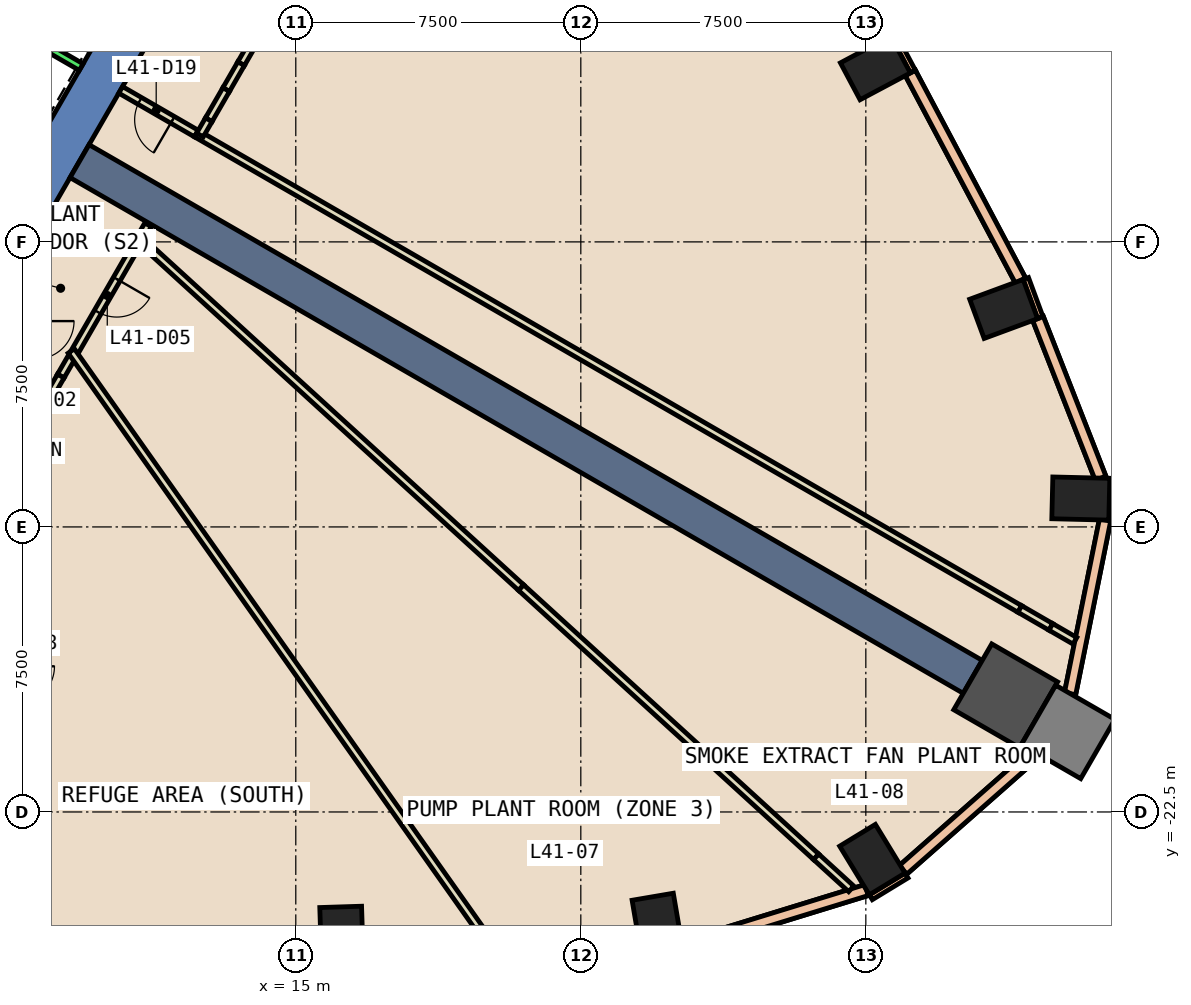
"""IFC4 building model, lengths in metres.
Left out: names, types, materials, properties, quantities, classifications, styles, units other than length and angle.
Written with IfcOpenShell. Run it as: python <this file> out.ifc"""

import sys

from ifc_helpers import new_model, si_unit, direction, frame, frame_2d, origin, origin_2d, place, context, subcontext, project, spatial, polyline, rectangle, outline, extrude, element, fill, save


model = new_model("IFC4")
c1 = context("Model", 3, precision=1e-05, world=origin(), true_north=direction((0.0, 1.0)))
c2 = subcontext(c1, "Body", "Model", "MODEL_VIEW")
j1 = project(units=[si_unit("LENGTHUNIT", "METRE"), si_unit("PLANEANGLEUNIT", "RADIAN")], contexts=[c1])
p1 = place(None, origin())
s1 = spatial("IfcSite", under=j1, at=p1, CompositionType="ELEMENT")
p2 = place(p1, origin())
s2 = spatial("IfcBuilding", under=s1, at=p2, CompositionType="ELEMENT")
p3 = place(p2, frame((0.0, 0.0, 184.4)))
s3 = spatial("IfcBuildingStorey", under=s2, at=p3, CompositionType="ELEMENT", Elevation=184.4)
for number, where, z_axis, x_axis in (
    (1, (16.205, -25.747, -0.6), (0.0, 0.0, 1.0), (0.999, 0.032, 0.0)),
    (2, (24.518, -25.47, -0.6), (0.0, 0.0, 1.0), (0.986, 0.168, 0.0)),
    (3, (30.172, -23.754, -0.6), (0.0, 0.0, 1.0), (0.854, 0.521, 0.0)),
):
    element("IfcColumn", number, at=place(p3, frame(where, z_axis=z_axis, x_axis=x_axis)), inside=s3, PredefinedType="COLUMN", context=c2, shape_type="SweptSolid", body=[
        extrude(rectangle(XDim=1.1, YDim=1.5, at=origin_2d()), origin(), (0.0, 0.0, 1.0), 5.4),
    ])
p4 = place(p3, frame((33.68, -19.444, -0.6), z_axis=(0.0, 0.0, 1.0), x_axis=(-0.866025403784, 0.5, 0.0)))
e4 = element("IfcColumn", 4, at=p4, inside=s3, PredefinedType="COLUMN", context=c2, shape_type="SweptSolid", body=[
    extrude(rectangle(XDim=2.0, YDim=2.0, at=origin_2d()), origin(), (0.0, 0.0, 1.0), 5.4),
])
for number, where, z_axis, x_axis in (
    (5, (35.657, -14.253, -0.6), (0.0, 0.0, 1.0), (0.024, 1.0, 0.0)),
    (6, (33.627, -9.265, -0.6), (0.0, 0.0, 1.0), (-0.347, 0.938, 0.0)),
    (7, (30.252, -2.922, -0.6), (0.0, 0.0, 1.0), (-0.47, 0.883, 0.0)),
):
    element("IfcColumn", number, at=place(p3, frame(where, z_axis=z_axis, x_axis=x_axis)), inside=s3, PredefinedType="COLUMN", context=c2, shape_type="SweptSolid", body=[
        extrude(rectangle(XDim=1.1, YDim=1.5, at=origin_2d()), origin(), (0.0, 0.0, 1.0), 5.4),
    ])
p5 = place(p3, frame((35.325, -20.394, -0.6), z_axis=(0.0, 0.0, 1.0), x_axis=(-0.866025403784, 0.5, 0.0)))
e8 = element("IfcColumn", 8, at=p5, inside=s3, PredefinedType="COLUMN", context=c2, shape_type="SweptSolid", body=[
    extrude(rectangle(XDim=1.8, YDim=1.8, at=origin_2d()), origin(), (0.0, 0.0, 1.0), 5.4),
])
p6 = place(p3, frame((0.0, 0.0, -0.6)))
e9 = element("IfcWall", 9, at=p6, inside=s3, PredefinedType="SHEAR", context=c2, shape_type="SweptSolid", body=[
    extrude(outline(polyline([(6.928, -9.5), (13.856, 2.5), (12.471, 2.5), (6.235, -8.3), (6.928, -9.5)])), origin(), (0.0, 0.0, 1.0), 5.4),
])
p7 = place(p3, frame((9.31, -5.375, 0.0), z_axis=(0.0, 0.0, 1.0), x_axis=(0.866015103238, -0.500017840646, 0.0)))
e10 = element("IfcWall", 10, at=p7, inside=s3, PredefinedType="SHEAR", context=c2, shape_type="SweptSolid", body=[
    extrude(rectangle(XDim=27.139, YDim=1.0, at=frame_2d((13.57, 0.0))), origin(), (0.0, 0.0, 1.0), 4.8),
])
p8 = place(p3, frame((34.591, -9.495, 0.0), z_axis=(0.0, 0.0, 1.0), x_axis=(-0.346353054777, 0.93810423805, 0.0)))
e11 = element("IfcWall", 11, at=p8, inside=s3, PredefinedType="STANDARD", context=c2, shape_type="SweptSolid", body=[
    extrude(rectangle(XDim=1.1, YDim=0.15, at=frame_2d((0.55, 0.0))), origin(), (0.0, 0.0, 1.0), 4.8),
])
p9 = place(p3, frame((31.238, -3.02, 0.0), z_axis=(0.0, 0.0, 1.0), x_axis=(-0.470058271093, 0.88263538439, 0.0)))
e12 = element("IfcWall", 12, at=p9, inside=s3, PredefinedType="STANDARD", context=c2, shape_type="SweptSolid", body=[
    extrude(rectangle(XDim=1.1, YDim=0.15, at=frame_2d((0.55, 0.0))), origin(), (0.0, 0.0, 1.0), 4.8),
])
p10 = place(p3, frame((30.132, -24.744, 0.0), z_axis=(0.0, 0.0, 1.0), x_axis=(0.854104197553, 0.520101932051, 0.0)))
e13 = element("IfcWall", 13, at=p10, inside=s3, PredefinedType="STANDARD", context=c2, shape_type="SweptSolid", body=[
    extrude(rectangle(XDim=1.099, YDim=0.15, at=frame_2d((0.55, 0.0))), origin(), (0.0, 0.0, 1.0), 4.8),
])
p11 = place(p3, frame((36.469, -14.823, 0.0), z_axis=(0.0, 0.0, 1.0), x_axis=(0.023739424163, 0.999718180159, 0.0)))
e14 = element("IfcWall", 14, at=p11, inside=s3, PredefinedType="STANDARD", context=c2, shape_type="SweptSolid", body=[
    extrude(rectangle(XDim=1.1, YDim=0.15, at=frame_2d((0.55, 0.0))), origin(), (0.0, 0.0, 1.0), 4.8),
])
p12 = place(p3, frame((25.173, -26.045, 0.0), z_axis=(0.0, 0.0, 1.0), x_axis=(0.955892434745, 0.293716961031, 0.0)))
e15 = element("IfcWall", 15, at=p12, inside=s3, PredefinedType="STANDARD", context=c2, shape_type="SweptSolid", body=[
    extrude(rectangle(XDim=5.07, YDim=0.3, at=frame_2d((2.535, 0.0))), origin(), (0.0, 0.0, 1.0), 1.2),
])
p13 = place(p3, frame((25.173, -26.045, 4.0), z_axis=(0.0, 0.0, 1.0), x_axis=(0.955892434745, 0.293716961031, 0.0)))
e16 = element("IfcWall", 16, at=p13, inside=s3, PredefinedType="STANDARD", context=c2, shape_type="SweptSolid", body=[
    extrude(rectangle(XDim=5.07, YDim=0.3, at=frame_2d((2.535, 0.0))), origin(), (0.0, 0.0, 1.0), 0.8),
])
p14 = place(p3, frame((30.98, -24.023, 0.0), z_axis=(0.0, 0.0, 1.0), x_axis=(0.750235237227, 0.661170998171, 0.0)))
e17 = element("IfcWall", 17, at=p14, inside=s3, PredefinedType="STANDARD", context=c2, shape_type="SweptSolid", body=[
    extrude(rectangle(XDim=4.66, YDim=0.3, at=frame_2d((2.33, 0.0))), origin(), (0.0, 0.0, 1.0), 1.2),
])
p15 = place(p3, frame((30.98, -24.023, 4.0), z_axis=(0.0, 0.0, 1.0), x_axis=(0.750235237227, 0.661170998171, 0.0)))
e18 = element("IfcWall", 18, at=p15, inside=s3, PredefinedType="STANDARD", context=c2, shape_type="SweptSolid", body=[
    extrude(rectangle(XDim=4.66, YDim=0.3, at=frame_2d((2.33, 0.0))), origin(), (0.0, 0.0, 1.0), 0.8),
])
p16 = place(p3, frame((35.375, -19.385, 0.0), z_axis=(0.0, 0.0, 1.0), x_axis=(0.197466415614, 0.980309652459, 0.0)))
e19 = element("IfcWall", 19, at=p16, inside=s3, PredefinedType="STANDARD", context=c2, shape_type="SweptSolid", body=[
    extrude(rectangle(XDim=4.659, YDim=0.3, at=frame_2d((2.329, 0.0))), origin(), (0.0, 0.0, 1.0), 1.2),
])
p17 = place(p3, frame((35.375, -19.385, 4.0), z_axis=(0.0, 0.0, 1.0), x_axis=(0.197466415614, 0.980309652459, 0.0)))
e20 = element("IfcWall", 20, at=p17, inside=s3, PredefinedType="STANDARD", context=c2, shape_type="SweptSolid", body=[
    extrude(rectangle(XDim=4.659, YDim=0.3, at=frame_2d((2.329, 0.0))), origin(), (0.0, 0.0, 1.0), 0.8),
])
p18 = place(p3, frame((36.177, -13.717, 0.0), z_axis=(0.0, 0.0, 1.0), x_axis=(-0.364813480186, 0.931080622006, 0.0)))
e21 = element("IfcWall", 21, at=p18, inside=s3, PredefinedType="STANDARD", context=c2, shape_type="SweptSolid", body=[
    extrude(rectangle(XDim=4.512, YDim=0.3, at=frame_2d((2.256, 0.0))), origin(), (0.0, 0.0, 1.0), 1.2),
])
p19 = place(p3, frame((36.177, -13.717, 4.0), z_axis=(0.0, 0.0, 1.0), x_axis=(-0.364813480186, 0.931080622006, 0.0)))
e22 = element("IfcWall", 22, at=p19, inside=s3, PredefinedType="STANDARD", context=c2, shape_type="SweptSolid", body=[
    extrude(rectangle(XDim=4.512, YDim=0.3, at=frame_2d((2.256, 0.0))), origin(), (0.0, 0.0, 1.0), 0.8),
])
p20 = place(p3, frame((34.069, -8.516, 0.0), z_axis=(0.0, 0.0, 1.0), x_axis=(-0.468703860557, 0.883355359467, 0.0)))
e23 = element("IfcWall", 23, at=p20, inside=s3, PredefinedType="STANDARD", context=c2, shape_type="SweptSolid", body=[
    extrude(rectangle(XDim=6.183, YDim=0.3, at=frame_2d((3.092, 0.0))), origin(), (0.0, 0.0, 1.0), 1.2),
])
p21 = place(p3, frame((34.069, -8.516, 4.0), z_axis=(0.0, 0.0, 1.0), x_axis=(-0.468703860557, 0.883355359467, 0.0)))
e24 = element("IfcWall", 24, at=p21, inside=s3, PredefinedType="STANDARD", context=c2, shape_type="SweptSolid", body=[
    extrude(rectangle(XDim=6.183, YDim=0.3, at=frame_2d((3.092, 0.0))), origin(), (0.0, 0.0, 1.0), 0.8),
])
p22 = place(p3, frame((9.15, -10.451, 0.0), z_axis=(0.0, 0.0, 1.0), x_axis=(-0.499595985407, -0.8662585361, 0.0)))
e25 = element("IfcWall", 25, at=p22, inside=s3, PredefinedType="PARTITIONING", context=c2, shape_type="SweptSolid", body=[
    extrude(rectangle(XDim=0.668, YDim=0.2, at=frame_2d((0.334, 0.0))), origin(), (0.0, 0.0, 1.0), 4.8),
])
p23 = place(p3, frame((10.89, -7.437, 0.0), z_axis=(0.0, 0.0, 1.0), x_axis=(-0.499979528911, -0.866037222451, 0.0)))
e26 = element("IfcWall", 26, at=p23, inside=s3, PredefinedType="PARTITIONING", context=c2, shape_type="SweptSolid", body=[
    extrude(rectangle(XDim=3.48, YDim=0.2, at=frame_2d((1.74, 0.0))), origin(), (0.0, 0.0, 1.0), 4.8),
])
p24 = place(p23, frame((1.202, 0.0, 0.0)))
e27 = element("IfcOpeningElement", 27, at=p24, cuts=e26, PredefinedType="OPENING", context=c2, shape_type="SweptSolid", body=[
    extrude(rectangle(XDim=1.0, YDim=2.1, at=frame_2d((0.5, 1.05))), frame((0.0, 0.11, 0.0), z_axis=(0.0, -1.0, 0.0), x_axis=(1.0, 0.0, 0.0)), (0.0, 0.0, 1.0), 0.22),
])
p25 = place(p3, frame((11.113, -7.051, 0.0), z_axis=(0.0, 0.0, 1.0), x_axis=(-0.499207881238, -0.866482251007, 0.0)))
e28 = element("IfcWall", 28, at=p25, inside=s3, PredefinedType="PARTITIONING", context=c2, shape_type="SweptSolid", body=[
    extrude(rectangle(XDim=0.411, YDim=0.2, at=frame_2d((0.206, 0.0))), origin(), (0.0, 0.0, 1.0), 2.4),
])
p26 = place(p3, frame((9.092, -10.37, 0.0), z_axis=(0.0, 0.0, 1.0), x_axis=(0.57710323801, -0.816671202308, 0.0)))
e29 = element("IfcWall", 29, at=p26, inside=s3, PredefinedType="PARTITIONING", context=c2, shape_type="SweptSolid", body=[
    extrude(rectangle(XDim=19.393, YDim=0.2, at=frame_2d((9.697, 0.0))), origin(), (0.0, 0.0, 1.0), 4.8),
])
p27 = place(p3, frame((10.816, -7.37, 0.0), z_axis=(0.0, 0.0, 1.0), x_axis=(0.738734088882, -0.673996992519, 0.0)))
e30 = element("IfcWall", 30, at=p27, inside=s3, PredefinedType="PARTITIONING", context=c2, shape_type="SweptSolid", body=[
    extrude(rectangle(XDim=13.69, YDim=0.2, at=frame_2d((6.845, 0.0))), origin(), (0.0, 0.0, 1.0), 2.4),
])
p28 = place(p3, frame((12.384, -4.65, 0.0), z_axis=(0.0, 0.0, 1.0), x_axis=(-0.866053019151, 0.499952165731, 0.0)))
e31 = element("IfcWall", 31, at=p28, inside=s3, PredefinedType="PARTITIONING", context=c2, shape_type="SweptSolid", body=[
    extrude(rectangle(XDim=2.3, YDim=0.2, at=frame_2d((1.15, 0.0))), origin(), (0.0, 0.0, 1.0), 4.8),
])
p29 = place(p28, frame((0.721, 0.0, 0.0)))
e32 = element("IfcOpeningElement", 32, at=p29, cuts=e31, PredefinedType="OPENING", context=c2, shape_type="SweptSolid", body=[
    extrude(rectangle(XDim=1.0, YDim=2.1, at=frame_2d((0.5, 1.05))), frame((0.0, 0.11, 0.0), z_axis=(0.0, -1.0, 0.0), x_axis=(1.0, 0.0, 0.0)), (0.0, 0.0, 1.0), 0.22),
])
p30 = place(p3, frame((12.384, -4.65, 0.0), z_axis=(0.0, 0.0, 1.0), x_axis=(0.866042267005, -0.499970790907, 0.0)))
e33 = element("IfcWall", 33, at=p30, inside=s3, PredefinedType="PARTITIONING", context=c2, shape_type="SweptSolid", body=[
    extrude(rectangle(XDim=25.02, YDim=0.2, at=frame_2d((12.51, 0.0))), origin(), (0.0, 0.0, 1.0), 4.8),
])
p31 = place(p3, frame((8.816, -11.03, 0.0), z_axis=(0.0, 0.0, 1.0), x_axis=(-0.499633176362, -0.866237085952, 0.0)))
e34 = element("IfcWall", 34, at=p31, inside=s3, PredefinedType="PARTITIONING", context=c2, shape_type="SweptSolid", body=[
    extrude(rectangle(XDim=1.105, YDim=0.2, at=frame_2d((0.552, 0.0))), origin(), (0.0, 0.0, 1.0), 2.4),
])
p32 = place(p3, frame((20.929, -16.597, 0.0), z_axis=(0.0, 0.0, 1.0), x_axis=(0.738717318159, -0.674015373602, 0.0)))
e35 = element("IfcWall", 35, at=p32, inside=s3, PredefinedType="PARTITIONING", context=c2, shape_type="SweptSolid", body=[
    extrude(rectangle(XDim=10.509, YDim=0.2, at=frame_2d((5.254, 0.0))), origin(), (0.0, 0.0, 1.0), 4.8),
])
p33 = place(p3, frame((28.692, -23.68, 0.0), z_axis=(0.0, 0.0, 1.0), x_axis=(0.738764319848, -0.67396385639, 0.0)))
e36 = element("IfcWall", 36, at=p33, inside=s3, PredefinedType="PARTITIONING", context=c2, shape_type="SweptSolid", body=[
    extrude(rectangle(XDim=1.251, YDim=0.2, at=frame_2d((0.625, 0.0))), origin(), (0.0, 0.0, 1.0), 2.4),
])
p34 = place(p3, frame((34.052, -17.159, 0.0), z_axis=(0.0, 0.0, 1.0), x_axis=(0.865780375256, -0.500424161908, 0.0)))
e37 = element("IfcWall", 37, at=p34, inside=s3, PredefinedType="PARTITIONING", context=c2, shape_type="SweptSolid", body=[
    extrude(rectangle(XDim=0.944, YDim=0.2, at=frame_2d((0.472, 0.0))), origin(), (0.0, 0.0, 1.0), 2.4),
])
p35 = place(p3, frame((34.869, -17.631, 0.0), z_axis=(0.0, 0.0, 1.0), x_axis=(0.866324606874, -0.499481406586, 0.0)))
e38 = element("IfcWall", 38, at=p35, inside=s3, PredefinedType="PARTITIONING", context=c2, shape_type="SweptSolid", body=[
    extrude(rectangle(XDim=0.731, YDim=0.2, at=frame_2d((0.365, 0.0))), origin(), (0.0, 0.0, 1.0), 4.8),
])
p36 = place(p3, frame((14.037, -1.986, 0.0), z_axis=(0.0, 0.0, 1.0), x_axis=(-0.4998334002, -0.86612156886, 0.0)))
e39 = element("IfcWall", 39, at=p36, inside=s3, PredefinedType="PARTITIONING", context=c2, shape_type="SweptSolid", body=[
    extrude(rectangle(XDim=0.952, YDim=0.2, at=frame_2d((0.476, 0.0))), origin(), (0.0, 0.0, 1.0), 2.4),
])
p37 = place(p3, frame((13.561, -2.811, 0.0), z_axis=(0.0, 0.0, 1.0), x_axis=(-0.499409130319, -0.866366273901, 0.0)))
e40 = element("IfcWall", 40, at=p37, inside=s3, PredefinedType="PARTITIONING", context=c2, shape_type="SweptSolid", body=[
    extrude(rectangle(XDim=0.787, YDim=0.2, at=frame_2d((0.394, 0.0))), origin(), (0.0, 0.0, 1.0), 4.8),
])
p38 = place(p3, frame((13.168, -3.493, 0.0), z_axis=(0.0, 0.0, 1.0), x_axis=(-0.500153222552, -0.865936922628, 0.0)))
e41 = element("IfcWall", 41, at=p38, inside=s3, PredefinedType="PARTITIONING", context=c2, shape_type="SweptSolid", body=[
    extrude(rectangle(XDim=0.916, YDim=0.2, at=frame_2d((0.458, 0.0))), origin(), (0.0, 0.0, 1.0), 2.4),
])
p39 = place(p3, frame((12.71, -4.286, 0.0), z_axis=(0.0, 0.0, 1.0), x_axis=(-0.500558482794, -0.8657027234, 0.0)))
e42 = element("IfcWall", 42, at=p39, inside=s3, PredefinedType="PARTITIONING", context=c2, shape_type="SweptSolid", body=[
    extrude(rectangle(XDim=0.463, YDim=0.2, at=frame_2d((0.232, 0.0))), origin(), (0.0, 0.0, 1.0), 4.8),
])
p40 = place(p3, frame((4.451, -6.19, 0.0), z_axis=(0.0, 0.0, 1.0), x_axis=(0.50000090737, 0.866024879913, 0.0)))
e43 = element("IfcWall", 43, at=p40, inside=s3, PredefinedType="STANDARD", context=c2, shape_type="SweptSolid", body=[
    extrude(rectangle(XDim=10.6, YDim=0.2, at=frame_2d((5.3, 0.0))), origin(), (0.0, 0.0, 1.0), 4.8),
])
p41 = place(p3, frame((7.188, -1.65, 0.0), z_axis=(0.0, 0.0, 1.0), x_axis=(0.866022959057, -0.500004234368, 0.0)))
e44 = element("IfcWall", 44, at=p41, inside=s3, PredefinedType="STANDARD", context=c2, shape_type="SweptSolid", body=[
    extrude(rectangle(XDim=2.5, YDim=0.2, at=frame_2d((1.25, 0.0))), origin(), (0.0, 0.0, 1.0), 4.8),
])
p42 = place(p24, origin())
e45 = element("IfcDoor", 45, at=p42, inside=s3, OperationType="SINGLE_SWING_LEFT", PredefinedType="DOOR", context=c2, shape_type="SweptSolid", body=[
    extrude(rectangle(XDim=1.0, YDim=2.1, at=frame_2d((0.5, 1.05))), frame((0.0, 0.025, 0.0), z_axis=(0.0, -1.0, 0.0), x_axis=(1.0, 0.0, 0.0)), (0.0, 0.0, 1.0), 0.05),
])
fill(e27, e45)
p43 = place(p29, origin())
e46 = element("IfcDoor", 46, at=p43, inside=s3, OperationType="SINGLE_SWING_LEFT", PredefinedType="DOOR", context=c2, shape_type="SweptSolid", body=[
    extrude(rectangle(XDim=1.0, YDim=2.1, at=frame_2d((0.5, 1.05))), frame((0.0, 0.025, 0.0), z_axis=(0.0, -1.0, 0.0), x_axis=(1.0, 0.0, 0.0)), (0.0, 0.0, 1.0), 0.05),
])
fill(e32, e46)
save(model, sys.argv[1])
